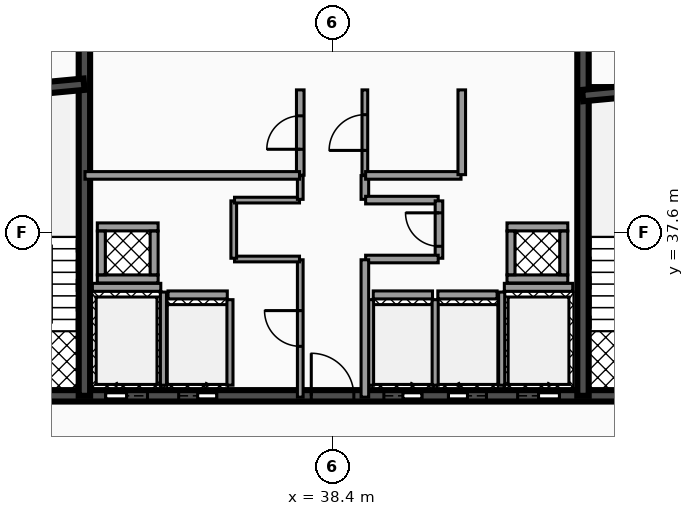
"""IFC4 building model, lengths in metres.
Left out: names, types, materials, properties, quantities, classifications, styles, units other than length and angle.
Written with IfcOpenShell. Run it as: python <this file> out.ifc"""

import sys

from ifc_helpers import new_model, si_unit, direction, frame, frame_2d, origin, place, context, subcontext, project, spatial, rectangle, extrude, element, fill, save


model = new_model("IFC4")
c1 = context("Model", 3, precision=1e-05, world=origin(), true_north=direction((0.0, 1.0)))
c2 = subcontext(c1, "Body", "Model", "MODEL_VIEW")
j1 = project(units=[si_unit("LENGTHUNIT", "METRE"), si_unit("PLANEANGLEUNIT", "RADIAN")], contexts=[c1])
p1 = place(None, origin())
s1 = spatial("IfcSite", under=j1, at=p1, CompositionType="ELEMENT")
p2 = place(p1, origin())
s2 = spatial("IfcBuilding", under=s1, at=p2, CompositionType="ELEMENT")
p3 = place(p2, frame((0.0, 0.0, 208.76)))
s3 = spatial("IfcBuildingStorey", under=s2, at=p3, CompositionType="ELEMENT", Elevation=208.76)
p4 = place(p3, frame((28.5, 33.3, 0.0), z_axis=(0.0, 0.0, 1.0), x_axis=(1.0, 0.0, 0.0)))
e1 = element("IfcWall", 1, at=p4, inside=s3, PredefinedType="SHEAR", context=c2, shape_type="SweptSolid", body=[
    extrude(rectangle(XDim=19.86, YDim=0.3, at=frame_2d((9.93, 0.0))), origin(), (0.0, 0.0, 1.0), 3.18),
])
p5 = place(p4, frame((3.93, 0.0, 0.0)))
e2 = element("IfcOpeningElement", 2, at=p5, cuts=e1, PredefinedType="OPENING", context=c2, shape_type="SweptSolid", body=[
    extrude(rectangle(XDim=1.1, YDim=2.15, at=frame_2d((0.55, 1.075))), frame((0.0, 0.16, 0.0), z_axis=(0.0, -1.0, 0.0), x_axis=(1.0, 0.0, 0.0)), (0.0, 0.0, 1.0), 0.32),
])
p6 = place(p4, frame((14.77, 0.0, 0.0)))
e3 = element("IfcOpeningElement", 3, at=p6, cuts=e1, PredefinedType="OPENING", context=c2, shape_type="SweptSolid", body=[
    extrude(rectangle(XDim=1.1, YDim=2.15, at=frame_2d((0.55, 1.075))), frame((0.0, 0.16, 0.0), z_axis=(0.0, -1.0, 0.0), x_axis=(1.0, 0.0, 0.0)), (0.0, 0.0, 1.0), 0.32),
])
p7 = place(p4, frame((11.25, 0.0, 0.0)))
e4 = element("IfcOpeningElement", 4, at=p7, cuts=e1, PredefinedType="OPENING", context=c2, shape_type="SweptSolid", body=[
    extrude(rectangle(XDim=1.0, YDim=2.1, at=frame_2d((0.5, 1.05))), frame((0.0, 0.16, 0.0), z_axis=(0.0, -1.0, 0.0), x_axis=(1.0, 0.0, 0.0)), (0.0, 0.0, 1.0), 0.32),
])
p8 = place(p4, frame((12.95, 0.0, 0.0)))
e5 = element("IfcOpeningElement", 5, at=p8, cuts=e1, PredefinedType="OPENING", context=c2, shape_type="SweptSolid", body=[
    extrude(rectangle(XDim=1.0, YDim=2.1, at=frame_2d((0.5, 1.05))), frame((0.0, 0.16, 0.0), z_axis=(0.0, -1.0, 0.0), x_axis=(1.0, 0.0, 0.0)), (0.0, 0.0, 1.0), 0.32),
])
p9 = place(p4, frame((5.85, 0.0, 0.0)))
e6 = element("IfcOpeningElement", 6, at=p9, cuts=e1, PredefinedType="OPENING", context=c2, shape_type="SweptSolid", body=[
    extrude(rectangle(XDim=1.0, YDim=2.1, at=frame_2d((0.5, 1.05))), frame((0.0, 0.16, 0.0), z_axis=(0.0, -1.0, 0.0), x_axis=(1.0, 0.0, 0.0)), (0.0, 0.0, 1.0), 0.32),
])
p10 = place(p4, frame((1.21, 0.0, 0.0)))
e7 = element("IfcOpeningElement", 7, at=p10, cuts=e1, PredefinedType="OPENING", context=c2, shape_type="SweptSolid", body=[
    extrude(rectangle(XDim=1.1, YDim=2.2, at=frame_2d((0.55, 1.1))), frame((0.0, 0.16, 0.0), z_axis=(0.0, -1.0, 0.0), x_axis=(1.0, 0.0, 0.0)), (0.0, 0.0, 1.0), 0.32),
])
p11 = place(p4, frame((9.34, 0.0, 0.0)))
e8 = element("IfcOpeningElement", 8, at=p11, cuts=e1, PredefinedType="OPENING", context=c2, shape_type="SweptSolid", body=[
    extrude(rectangle(XDim=1.12, YDim=2.05, at=frame_2d((0.56, 1.025))), frame((0.0, 0.16, 0.0), z_axis=(0.0, -1.0, 0.0), x_axis=(1.0, 0.0, 0.0)), (0.0, 0.0, 1.0), 0.32),
])
p12 = place(p4, frame((17.55, 0.0, 0.0)))
e9 = element("IfcOpeningElement", 9, at=p12, cuts=e1, PredefinedType="OPENING", context=c2, shape_type="SweptSolid", body=[
    extrude(rectangle(XDim=1.1, YDim=2.2, at=frame_2d((0.55, 1.1))), frame((0.0, 0.16, 0.0), z_axis=(0.0, -1.0, 0.0), x_axis=(1.0, 0.0, 0.0)), (0.0, 0.0, 1.0), 0.32),
])
for number, where, z_axis, x_axis in (
    (10, (31.87, 33.3, 0.0), (0.0, 0.0, 1.0), (0.0, 1.0, 0.0)),
    (11, (44.99, 33.3, 0.0), (0.0, 0.0, 1.0), (0.0, 1.0, 0.0)),
):
    element("IfcWall", number, at=place(p3, frame(where, z_axis=z_axis, x_axis=x_axis)), inside=s3, PredefinedType="SHEAR", context=c2, shape_type="SweptSolid", body=[
        extrude(rectangle(XDim=10.1, YDim=0.3, at=frame_2d((5.05, 0.0))), origin(), (0.0, 0.0, 1.0), 3.18),
    ])
p13 = place(p3, frame((28.64, 41.2, 0.0), z_axis=(0.0, 0.0, 1.0), x_axis=(0.995687118776, 0.092774789157, 0.0)))
e12 = element("IfcWall", 12, at=p13, inside=s3, PredefinedType="SHEAR", context=c2, shape_type="SweptSolid", body=[
    extrude(rectangle(XDim=3.234, YDim=0.3, at=frame_2d((1.617, 0.0))), origin(), (0.0, 0.0, 1.0), 3.18),
])
p14 = place(p3, frame((44.98, 41.2, 0.0), z_axis=(0.0, 0.0, 1.0), x_axis=(0.995686468965, 0.09278176286, 0.0)))
e13 = element("IfcWall", 13, at=p14, inside=s3, PredefinedType="SHEAR", context=c2, shape_type="SweptSolid", body=[
    extrude(rectangle(XDim=3.234, YDim=0.3, at=frame_2d((1.617, 0.0))), origin(), (0.0, 0.0, 1.0), 3.18),
])
p15 = place(p3, frame((32.08, 36.155, 0.0), z_axis=(0.0, 0.0, 1.0), x_axis=(1.0, 0.0, 0.0)))
e14 = element("IfcWall", 14, at=p15, inside=s3, PredefinedType="SOLIDWALL", context=c2, shape_type="SweptSolid", body=[
    extrude(rectangle(XDim=1.8, YDim=0.21, at=frame_2d((0.9, 0.0))), origin(), (0.0, 0.0, 1.0), 3.18),
])
p16 = place(p3, frame((33.95, 33.58, 0.0), z_axis=(0.0, 0.0, 1.0), x_axis=(0.0, 1.0, 0.0)))
e15 = element("IfcWall", 15, at=p16, inside=s3, PredefinedType="SOLIDWALL", context=c2, shape_type="SweptSolid", body=[
    extrude(rectangle(XDim=2.45, YDim=0.16, at=frame_2d((1.225, 0.0))), origin(), (0.0, 0.0, 1.0), 3.18),
])
p17 = place(p3, frame((42.92, 36.155, 0.0), z_axis=(0.0, 0.0, 1.0), x_axis=(1.0, 0.0, 0.0)))
e16 = element("IfcWall", 16, at=p17, inside=s3, PredefinedType="SOLIDWALL", context=c2, shape_type="SweptSolid", body=[
    extrude(rectangle(XDim=1.8, YDim=0.21, at=frame_2d((0.9, 0.0))), origin(), (0.0, 0.0, 1.0), 3.18),
])
p18 = place(p3, frame((42.85, 33.58, 0.0), z_axis=(0.0, 0.0, 1.0), x_axis=(0.0, 1.0, 0.0)))
e17 = element("IfcWall", 17, at=p18, inside=s3, PredefinedType="SOLIDWALL", context=c2, shape_type="SweptSolid", body=[
    extrude(rectangle(XDim=2.45, YDim=0.16, at=frame_2d((1.225, 0.0))), origin(), (0.0, 0.0, 1.0), 3.18),
])
p19 = place(p3, frame((39.47, 35.955, 0.0), z_axis=(0.0, 0.0, 1.0), x_axis=(1.0, 0.0, 0.0)))
e18 = element("IfcWall", 18, at=p19, inside=s3, PredefinedType="SOLIDWALL", context=c2, shape_type="SweptSolid", body=[
    extrude(rectangle(XDim=1.56, YDim=0.21, at=frame_2d((0.78, 0.0))), origin(), (0.0, 0.0, 1.0), 3.18),
])
for number, where, z_axis, x_axis in (
    (19, (39.4, 33.58, 0.0), (0.0, 0.0, 1.0), (0.0, 1.0, 0.0)),
    (20, (41.1, 33.58, 0.0), (0.0, 0.0, 1.0), (0.0, 1.0, 0.0)),
):
    element("IfcWall", number, at=place(p3, frame(where, z_axis=z_axis, x_axis=x_axis)), inside=s3, PredefinedType="SOLIDWALL", context=c2, shape_type="SweptSolid", body=[
        extrude(rectangle(XDim=2.25, YDim=0.16, at=frame_2d((1.125, 0.0))), origin(), (0.0, 0.0, 1.0), 3.18),
    ])
p20 = place(p3, frame((41.17, 35.955, 0.0), z_axis=(0.0, 0.0, 1.0), x_axis=(1.0, 0.0, 0.0)))
e21 = element("IfcWall", 21, at=p20, inside=s3, PredefinedType="SOLIDWALL", context=c2, shape_type="SweptSolid", body=[
    extrude(rectangle(XDim=1.56, YDim=0.21, at=frame_2d((0.78, 0.0))), origin(), (0.0, 0.0, 1.0), 3.18),
])
p21 = place(p3, frame((34.07, 35.955, 0.0), z_axis=(0.0, 0.0, 1.0), x_axis=(1.0, 0.0, 0.0)))
e22 = element("IfcWall", 22, at=p21, inside=s3, PredefinedType="SOLIDWALL", context=c2, shape_type="SweptSolid", body=[
    extrude(rectangle(XDim=1.56, YDim=0.21, at=frame_2d((0.78, 0.0))), origin(), (0.0, 0.0, 1.0), 3.18),
])
p22 = place(p3, frame((35.7, 33.58, 0.0), z_axis=(0.0, 0.0, 1.0), x_axis=(0.0, 1.0, 0.0)))
e23 = element("IfcWall", 23, at=p22, inside=s3, PredefinedType="SOLIDWALL", context=c2, shape_type="SweptSolid", body=[
    extrude(rectangle(XDim=2.25, YDim=0.16, at=frame_2d((1.125, 0.0))), origin(), (0.0, 0.0, 1.0), 3.18),
])
for number, where, z_axis, x_axis in (
    (24, (32.21, 36.375, 0.0), (0.0, 0.0, 1.0), (1.0, 0.0, 0.0)),
    (25, (32.21, 37.745, 0.0), (0.0, 0.0, 1.0), (1.0, 0.0, 0.0)),
):
    element("IfcWall", number, at=place(p3, frame(where, z_axis=z_axis, x_axis=x_axis)), inside=s3, PredefinedType="SOLIDWALL", context=c2, shape_type="SweptSolid", body=[
        extrude(rectangle(XDim=1.6, YDim=0.21, at=frame_2d((0.8, 0.0))), origin(), (0.0, 0.0, 1.0), 3.18),
    ])
for number, where, z_axis, x_axis in (
    (26, (32.315, 36.485, 0.0), (0.0, 0.0, 1.0), (0.0, 1.0, 0.0)),
    (27, (33.705, 36.485, 0.0), (0.0, 0.0, 1.0), (0.0, 1.0, 0.0)),
):
    element("IfcWall", number, at=place(p3, frame(where, z_axis=z_axis, x_axis=x_axis)), inside=s3, PredefinedType="SOLIDWALL", context=c2, shape_type="SweptSolid", body=[
        extrude(rectangle(XDim=1.15, YDim=0.21, at=frame_2d((0.575, 0.0))), origin(), (0.0, 0.0, 1.0), 3.18),
    ])
for number, where, z_axis, x_axis in (
    (28, (42.99, 36.375, 0.0), (0.0, 0.0, 1.0), (1.0, 0.0, 0.0)),
    (29, (42.99, 37.745, 0.0), (0.0, 0.0, 1.0), (1.0, 0.0, 0.0)),
):
    element("IfcWall", number, at=place(p3, frame(where, z_axis=z_axis, x_axis=x_axis)), inside=s3, PredefinedType="SOLIDWALL", context=c2, shape_type="SweptSolid", body=[
        extrude(rectangle(XDim=1.6, YDim=0.21, at=frame_2d((0.8, 0.0))), origin(), (0.0, 0.0, 1.0), 3.18),
    ])
for number, where, z_axis, x_axis in (
    (30, (43.095, 36.485, 0.0), (0.0, 0.0, 1.0), (0.0, 1.0, 0.0)),
    (31, (44.485, 36.485, 0.0), (0.0, 0.0, 1.0), (0.0, 1.0, 0.0)),
):
    element("IfcWall", number, at=place(p3, frame(where, z_axis=z_axis, x_axis=x_axis)), inside=s3, PredefinedType="SOLIDWALL", context=c2, shape_type="SweptSolid", body=[
        extrude(rectangle(XDim=1.15, YDim=0.21, at=frame_2d((0.575, 0.0))), origin(), (0.0, 0.0, 1.0), 3.18),
    ])
p23 = place(p3, frame((37.55, 33.265, 0.0), z_axis=(0.0, 0.0, 1.0), x_axis=(0.0, 1.0, 0.0)))
e32 = element("IfcWall", 32, at=p23, inside=s3, PredefinedType="PARTITIONING", context=c2, shape_type="SweptSolid", body=[
    extrude(rectangle(XDim=3.615, YDim=0.15, at=frame_2d((1.808, 0.0))), origin(), (0.0, 0.0, 1.0), 2.235),
])
p24 = place(p23, frame((1.337, 0.0, 0.0)))
e33 = element("IfcOpeningElement", 33, at=p24, cuts=e32, PredefinedType="OPENING", context=c2, shape_type="SweptSolid", body=[
    extrude(rectangle(XDim=0.94, YDim=2.05, at=frame_2d((0.47, 1.025))), frame((0.0, 0.085, 0.0), z_axis=(0.0, -1.0, 0.0), x_axis=(1.0, 0.0, 0.0)), (0.0, 0.0, 1.0), 0.17),
])
p25 = place(p3, frame((35.82, 36.9, 0.0), z_axis=(0.0, 0.0, 1.0), x_axis=(1.0, 0.0, 0.0)))
e34 = element("IfcWall", 34, at=p25, inside=s3, PredefinedType="PARTITIONING", context=c2, shape_type="SweptSolid", body=[
    extrude(rectangle(XDim=1.71, YDim=0.15, at=frame_2d((0.855, 0.0))), origin(), (0.0, 0.0, 1.0), 2.235),
])
p26 = place(p3, frame((35.8, 36.92, 0.0), z_axis=(0.0, 0.0, 1.0), x_axis=(0.0, 1.0, 0.0)))
e35 = element("IfcWall", 35, at=p26, inside=s3, PredefinedType="PARTITIONING", context=c2, shape_type="SweptSolid", body=[
    extrude(rectangle(XDim=1.51, YDim=0.15, at=frame_2d((0.755, 0.0))), origin(), (0.0, 0.0, 1.0), 2.235),
])
p27 = place(p3, frame((35.82, 38.45, 0.0), z_axis=(0.0, 0.0, 1.0), x_axis=(1.0, 0.0, 0.0)))
e36 = element("IfcWall", 36, at=p27, inside=s3, PredefinedType="PARTITIONING", context=c2, shape_type="SweptSolid", body=[
    extrude(rectangle(XDim=1.71, YDim=0.15, at=frame_2d((0.855, 0.0))), origin(), (0.0, 0.0, 1.0), 2.235),
])
p28 = place(p3, frame((37.55, 38.47, 0.0), z_axis=(0.0, 0.0, 1.0), x_axis=(0.0, 1.0, 0.0)))
e37 = element("IfcWall", 37, at=p28, inside=s3, PredefinedType="PARTITIONING", context=c2, shape_type="SweptSolid", body=[
    extrude(rectangle(XDim=0.625, YDim=0.15, at=frame_2d((0.312, 0.0))), origin(), (0.0, 0.0, 1.0), 2.235),
])
p29 = place(p3, frame((37.55, 39.105, 0.0), z_axis=(0.0, 0.0, 1.0), x_axis=(0.0, 1.0, 0.0)))
e38 = element("IfcWall", 38, at=p29, inside=s3, PredefinedType="PARTITIONING", context=c2, shape_type="SweptSolid", body=[
    extrude(rectangle(XDim=2.245, YDim=0.2, at=frame_2d((1.123, 0.0))), origin(), (0.0, 0.0, 1.0), 2.235),
])
p30 = place(p29, frame((0.683, 0.0, 0.0)))
e39 = element("IfcOpeningElement", 39, at=p30, cuts=e38, PredefinedType="OPENING", context=c2, shape_type="SweptSolid", body=[
    extrude(rectangle(XDim=0.88, YDim=2.05, at=frame_2d((0.44, 1.025))), frame((0.0, 0.11, 0.0), z_axis=(0.0, -1.0, 0.0), x_axis=(1.0, 0.0, 0.0)), (0.0, 0.0, 1.0), 0.22),
])
p31 = place(p3, frame((39.25, 38.47, 0.0), z_axis=(0.0, 0.0, 1.0), x_axis=(0.0, 1.0, 0.0)))
e40 = element("IfcWall", 40, at=p31, inside=s3, PredefinedType="PARTITIONING", context=c2, shape_type="SweptSolid", body=[
    extrude(rectangle(XDim=0.625, YDim=0.2, at=frame_2d((0.312, 0.0))), origin(), (0.0, 0.0, 1.0), 2.235),
])
p32 = place(p3, frame((39.27, 38.45, 0.0), z_axis=(0.0, 0.0, 1.0), x_axis=(1.0, 0.0, 0.0)))
e41 = element("IfcWall", 41, at=p32, inside=s3, PredefinedType="PARTITIONING", context=c2, shape_type="SweptSolid", body=[
    extrude(rectangle(XDim=1.91, YDim=0.2, at=frame_2d((0.955, 0.0))), origin(), (0.0, 0.0, 1.0), 2.235),
])
p33 = place(p3, frame((41.2, 36.92, 0.0), z_axis=(0.0, 0.0, 1.0), x_axis=(0.0, 1.0, 0.0)))
e42 = element("IfcWall", 42, at=p33, inside=s3, PredefinedType="PARTITIONING", context=c2, shape_type="SweptSolid", body=[
    extrude(rectangle(XDim=1.51, YDim=0.2, at=frame_2d((0.755, 0.0))), origin(), (0.0, 0.0, 1.0), 2.235),
])
p34 = place(p33, frame((0.315, 0.0, 0.0)))
e43 = element("IfcOpeningElement", 43, at=p34, cuts=e42, PredefinedType="OPENING", context=c2, shape_type="SweptSolid", body=[
    extrude(rectangle(XDim=0.88, YDim=2.05, at=frame_2d((0.44, 1.025))), frame((0.0, 0.11, 0.0), z_axis=(0.0, -1.0, 0.0), x_axis=(1.0, 0.0, 0.0)), (0.0, 0.0, 1.0), 0.22),
])
p35 = place(p3, frame((39.27, 36.9, 0.0), z_axis=(0.0, 0.0, 1.0), x_axis=(1.0, 0.0, 0.0)))
e44 = element("IfcWall", 44, at=p35, inside=s3, PredefinedType="PARTITIONING", context=c2, shape_type="SweptSolid", body=[
    extrude(rectangle(XDim=1.91, YDim=0.2, at=frame_2d((0.955, 0.0))), origin(), (0.0, 0.0, 1.0), 2.235),
])
p36 = place(p3, frame((39.25, 33.265, 0.0), z_axis=(0.0, 0.0, 1.0), x_axis=(0.0, 1.0, 0.0)))
e45 = element("IfcWall", 45, at=p36, inside=s3, PredefinedType="PARTITIONING", context=c2, shape_type="SweptSolid", body=[
    extrude(rectangle(XDim=3.615, YDim=0.2, at=frame_2d((1.808, 0.0))), origin(), (0.0, 0.0, 1.0), 2.235),
])
p37 = place(p3, frame((39.25, 39.105, 0.0), z_axis=(0.0, 0.0, 1.0), x_axis=(0.0, 1.0, 0.0)))
e46 = element("IfcWall", 46, at=p37, inside=s3, PredefinedType="PARTITIONING", context=c2, shape_type="SweptSolid", body=[
    extrude(rectangle(XDim=2.245, YDim=0.15, at=frame_2d((1.123, 0.0))), origin(), (0.0, 0.0, 1.0), 2.235),
])
p38 = place(p37, frame((0.653, 0.0, 0.0)))
e47 = element("IfcOpeningElement", 47, at=p38, cuts=e46, PredefinedType="OPENING", context=c2, shape_type="SweptSolid", body=[
    extrude(rectangle(XDim=0.94, YDim=2.05, at=frame_2d((0.47, 1.025))), frame((0.0, 0.085, 0.0), z_axis=(0.0, -1.0, 0.0), x_axis=(1.0, 0.0, 0.0)), (0.0, 0.0, 1.0), 0.17),
])
p39 = place(p3, frame((31.885, 39.1, 0.0), z_axis=(0.0, 0.0, 1.0), x_axis=(1.0, 0.0, 0.0)))
e48 = element("IfcWall", 48, at=p39, inside=s3, PredefinedType="PARTITIONING", context=c2, shape_type="SweptSolid", body=[
    extrude(rectangle(XDim=5.645, YDim=0.2, at=frame_2d((2.823, 0.0))), origin(), (0.0, 0.0, 1.0), 2.235),
])
p40 = place(p3, frame((39.27, 39.1, 0.0), z_axis=(0.0, 0.0, 1.0), x_axis=(1.0, 0.0, 0.0)))
e49 = element("IfcWall", 49, at=p40, inside=s3, PredefinedType="PARTITIONING", context=c2, shape_type="SweptSolid", body=[
    extrude(rectangle(XDim=2.51, YDim=0.2, at=frame_2d((1.255, 0.0))), origin(), (0.0, 0.0, 1.0), 2.235),
])
p41 = place(p3, frame((41.8, 39.12, 0.0), z_axis=(0.0, 0.0, 1.0), x_axis=(0.0, 1.0, 0.0)))
e50 = element("IfcWall", 50, at=p41, inside=s3, PredefinedType="PARTITIONING", context=c2, shape_type="SweptSolid", body=[
    extrude(rectangle(XDim=2.23, YDim=0.2, at=frame_2d((1.115, 0.0))), origin(), (0.0, 0.0, 1.0), 2.235),
])
p42 = place(p5, origin())
e51 = element("IfcDoor", 51, at=p42, inside=s3, OperationType="SLIDING_TO_LEFT", PredefinedType="DOOR", context=c2, shape_type="SweptSolid", body=[
    extrude(rectangle(XDim=1.1, YDim=2.15, at=frame_2d((0.55, 1.075))), frame((0.0, 0.025, 0.0), z_axis=(0.0, -1.0, 0.0), x_axis=(1.0, 0.0, 0.0)), (0.0, 0.0, 1.0), 0.05),
])
fill(e2, e51)
p43 = place(p6, origin())
e52 = element("IfcDoor", 52, at=p43, inside=s3, OperationType="SLIDING_TO_RIGHT", PredefinedType="DOOR", context=c2, shape_type="SweptSolid", body=[
    extrude(rectangle(XDim=1.1, YDim=2.15, at=frame_2d((0.55, 1.075))), frame((0.0, 0.025, 0.0), z_axis=(0.0, -1.0, 0.0), x_axis=(1.0, 0.0, 0.0)), (0.0, 0.0, 1.0), 0.05),
])
fill(e3, e52)
p44 = place(p7, origin())
e53 = element("IfcDoor", 53, at=p44, inside=s3, OperationType="SLIDING_TO_RIGHT", PredefinedType="DOOR", context=c2, shape_type="SweptSolid", body=[
    extrude(rectangle(XDim=1.0, YDim=2.1, at=frame_2d((0.5, 1.05))), frame((0.0, 0.025, 0.0), z_axis=(0.0, -1.0, 0.0), x_axis=(1.0, 0.0, 0.0)), (0.0, 0.0, 1.0), 0.05),
])
fill(e4, e53)
p45 = place(p8, origin())
e54 = element("IfcDoor", 54, at=p45, inside=s3, OperationType="SLIDING_TO_LEFT", PredefinedType="DOOR", context=c2, shape_type="SweptSolid", body=[
    extrude(rectangle(XDim=1.0, YDim=2.1, at=frame_2d((0.5, 1.05))), frame((0.0, 0.025, 0.0), z_axis=(0.0, -1.0, 0.0), x_axis=(1.0, 0.0, 0.0)), (0.0, 0.0, 1.0), 0.05),
])
fill(e5, e54)
p46 = place(p9, origin())
e55 = element("IfcDoor", 55, at=p46, inside=s3, OperationType="SLIDING_TO_RIGHT", PredefinedType="DOOR", context=c2, shape_type="SweptSolid", body=[
    extrude(rectangle(XDim=1.0, YDim=2.1, at=frame_2d((0.5, 1.05))), frame((0.0, 0.025, 0.0), z_axis=(0.0, -1.0, 0.0), x_axis=(1.0, 0.0, 0.0)), (0.0, 0.0, 1.0), 0.05),
])
fill(e6, e55)
p47 = place(p11, origin())
e56 = element("IfcDoor", 56, at=p47, inside=s3, OperationType="SINGLE_SWING_LEFT", PredefinedType="DOOR", context=c2, shape_type="SweptSolid", body=[
    extrude(rectangle(XDim=1.12, YDim=2.05, at=frame_2d((0.56, 1.025))), frame((0.0, 0.025, 0.0), z_axis=(0.0, -1.0, 0.0), x_axis=(1.0, 0.0, 0.0)), (0.0, 0.0, 1.0), 0.05),
])
fill(e8, e56)
p48 = place(p24, origin())
e57 = element("IfcDoor", 57, at=p48, inside=s3, OperationType="SINGLE_SWING_RIGHT", PredefinedType="DOOR", context=c2, shape_type="SweptSolid", body=[
    extrude(rectangle(XDim=0.94, YDim=2.05, at=frame_2d((0.47, 1.025))), frame((0.0, 0.025, 0.0), z_axis=(0.0, -1.0, 0.0), x_axis=(1.0, 0.0, 0.0)), (0.0, 0.0, 1.0), 0.05),
])
fill(e33, e57)
p49 = place(p30, origin())
e58 = element("IfcDoor", 58, at=p49, inside=s3, OperationType="SINGLE_SWING_LEFT", PredefinedType="DOOR", context=c2, shape_type="SweptSolid", body=[
    extrude(rectangle(XDim=0.88, YDim=2.05, at=frame_2d((0.44, 1.025))), frame((0.0, 0.025, 0.0), z_axis=(0.0, -1.0, 0.0), x_axis=(1.0, 0.0, 0.0)), (0.0, 0.0, 1.0), 0.05),
])
fill(e39, e58)
p50 = place(p34, origin())
e59 = element("IfcDoor", 59, at=p50, inside=s3, OperationType="SINGLE_SWING_RIGHT", PredefinedType="DOOR", context=c2, shape_type="SweptSolid", body=[
    extrude(rectangle(XDim=0.88, YDim=2.05, at=frame_2d((0.44, 1.025))), frame((0.0, 0.025, 0.0), z_axis=(0.0, -1.0, 0.0), x_axis=(1.0, 0.0, 0.0)), (0.0, 0.0, 1.0), 0.05),
])
fill(e43, e59)
p51 = place(p38, origin())
e60 = element("IfcDoor", 60, at=p51, inside=s3, OperationType="SINGLE_SWING_LEFT", PredefinedType="DOOR", context=c2, shape_type="SweptSolid", body=[
    extrude(rectangle(XDim=0.94, YDim=2.05, at=frame_2d((0.47, 1.025))), frame((0.0, 0.025, 0.0), z_axis=(0.0, -1.0, 0.0), x_axis=(1.0, 0.0, 0.0)), (0.0, 0.0, 1.0), 0.05),
])
fill(e47, e60)
save(model, sys.argv[1])
